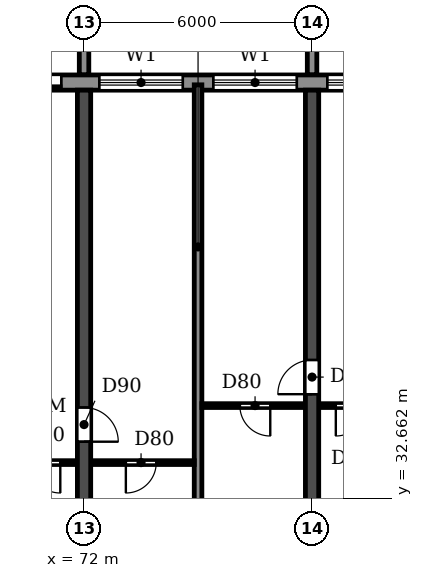
"""IFC4 building model, lengths in metres.
Left out: names, types, materials, properties, quantities, classifications, styles, units other than length and angle.
Written with IfcOpenShell. Run it as: python <this file> out.ifc"""

import sys

from ifc_helpers import new_model, si_unit, direction, frame, frame_2d, origin, place, context, subcontext, project, spatial, polyline, rectangle, outline, extrude, source, transform, mapped, element, fill, save


model = new_model("IFC4")
c1 = context("Model", 3, precision=1e-05, world=origin(), true_north=direction((0.0, 1.0)))
c2 = subcontext(c1, "Body", "Model", "MODEL_VIEW")
j1 = project(units=[si_unit("LENGTHUNIT", "METRE"), si_unit("PLANEANGLEUNIT", "RADIAN")], contexts=[c1])
p1 = place(None, origin())
s1 = spatial("IfcSite", under=j1, at=p1, CompositionType="ELEMENT")
p2 = place(p1, origin())
s2 = spatial("IfcBuilding", under=s1, at=p2, CompositionType="ELEMENT")
p3 = place(p2, frame((0.0, 0.0, 76.2)))
s3 = spatial("IfcBuildingStorey", under=s2, at=p3, CompositionType="ELEMENT", Elevation=76.2)
p4 = place(p3, frame((72.0, 30.525, 0.0), z_axis=(0.0, 0.0, 1.0), x_axis=(0.0, 1.0, 0.0)))
e1 = element("IfcWall", 1, at=p4, inside=s3, PredefinedType="SHEAR", context=c2, shape_type="SweptSolid", body=[
    extrude(rectangle(XDim=12.875, YDim=0.35, at=frame_2d((6.438, 0.0))), origin(), (0.0, 0.0, 1.0), 3.06),
])
p5 = place(p4, frame((3.625, 0.0, 0.0)))
e2 = element("IfcOpeningElement", 2, at=p5, cuts=e1, PredefinedType="OPENING", context=c2, shape_type="SweptSolid", body=[
    extrude(rectangle(XDim=0.9, YDim=2.1, at=frame_2d((0.45, 1.05))), frame((0.0, 0.185, 0.0), z_axis=(0.0, -1.0, 0.0), x_axis=(1.0, 0.0, 0.0)), (0.0, 0.0, 1.0), 0.37),
])
p6 = place(p3, frame((78.0, 30.525, 0.0), z_axis=(0.0, 0.0, 1.0), x_axis=(0.0, 1.0, 0.0)))
e3 = element("IfcWall", 3, at=p6, inside=s3, PredefinedType="SHEAR", context=c2, shape_type="SweptSolid", body=[
    extrude(rectangle(XDim=12.875, YDim=0.35, at=frame_2d((6.438, 0.0))), origin(), (0.0, 0.0, 1.0), 3.06),
])
p7 = place(p6, frame((4.875, 0.0, 0.0)))
e4 = element("IfcOpeningElement", 4, at=p7, cuts=e3, PredefinedType="OPENING", context=c2, shape_type="SweptSolid", body=[
    extrude(rectangle(XDim=0.9, YDim=2.1, at=frame_2d((0.45, 1.05))), frame((0.0, 0.185, 0.0), z_axis=(0.0, -1.0, 0.0), x_axis=(1.0, 0.0, 0.0)), (0.0, 0.0, 1.0), 0.37),
])
p8 = place(p3, frame((91.317, 43.6, 0.0), z_axis=(0.0, 0.0, 1.0), x_axis=(-1.0, 0.0, 0.0)))
e5 = element("IfcWall", 5, at=p8, inside=s3, PredefinedType="STANDARD", context=c2, shape_type="SweptSolid", body=[
    extrude(rectangle(XDim=80.634, YDim=0.4, at=frame_2d((40.317, 0.0))), origin(), (0.0, 0.0, 1.0), 3.06),
])
p9 = place(p8, frame((76.717, 0.0, 0.9)))
e6 = element("IfcOpeningElement", 6, at=p9, cuts=e5, PredefinedType="OPENING", context=c2, shape_type="SweptSolid", body=[
    extrude(rectangle(XDim=2.2, YDim=1.5, at=frame_2d((1.1, 0.75))), frame((0.0, 0.21, 0.0), z_axis=(0.0, -1.0, 0.0), x_axis=(1.0, 0.0, 0.0)), (0.0, 0.0, 1.0), 0.42),
])
p10 = place(p8, frame((73.917, 0.0, 0.0)))
e7 = element("IfcOpeningElement", 7, at=p10, cuts=e5, PredefinedType="OPENING", context=c2, shape_type="SweptSolid", body=[
    extrude(rectangle(XDim=1.8, YDim=2.4, at=frame_2d((0.9, 1.2))), frame((0.0, 0.21, 0.0), z_axis=(0.0, -1.0, 0.0), x_axis=(1.0, 0.0, 0.0)), (0.0, 0.0, 1.0), 0.42),
])
p11 = place(p8, frame((70.917, 0.0, 0.0)))
e8 = element("IfcOpeningElement", 8, at=p11, cuts=e5, PredefinedType="OPENING", context=c2, shape_type="SweptSolid", body=[
    extrude(rectangle(XDim=1.8, YDim=2.4, at=frame_2d((0.9, 1.2))), frame((0.0, 0.21, 0.0), z_axis=(0.0, -1.0, 0.0), x_axis=(1.0, 0.0, 0.0)), (0.0, 0.0, 1.0), 0.42),
])
p12 = place(p8, frame((67.717, 0.0, 0.9)))
e9 = element("IfcOpeningElement", 9, at=p12, cuts=e5, PredefinedType="OPENING", context=c2, shape_type="SweptSolid", body=[
    extrude(rectangle(XDim=2.2, YDim=1.5, at=frame_2d((1.1, 0.75))), frame((0.0, 0.21, 0.0), z_axis=(0.0, -1.0, 0.0), x_axis=(1.0, 0.0, 0.0)), (0.0, 0.0, 1.0), 0.42),
])
p13 = place(p8, frame((64.717, 0.0, 0.9)))
e10 = element("IfcOpeningElement", 10, at=p13, cuts=e5, PredefinedType="OPENING", context=c2, shape_type="SweptSolid", body=[
    extrude(rectangle(XDim=2.2, YDim=1.5, at=frame_2d((1.1, 0.75))), frame((0.0, 0.21, 0.0), z_axis=(0.0, -1.0, 0.0), x_axis=(1.0, 0.0, 0.0)), (0.0, 0.0, 1.0), 0.42),
])
p14 = place(p8, frame((61.917, 0.0, 0.0)))
e11 = element("IfcOpeningElement", 11, at=p14, cuts=e5, PredefinedType="OPENING", context=c2, shape_type="SweptSolid", body=[
    extrude(rectangle(XDim=1.8, YDim=2.4, at=frame_2d((0.9, 1.2))), frame((0.0, 0.21, 0.0), z_axis=(0.0, -1.0, 0.0), x_axis=(1.0, 0.0, 0.0)), (0.0, 0.0, 1.0), 0.42),
])
p15 = place(p8, frame((58.717, 0.0, 0.9)))
e12 = element("IfcOpeningElement", 12, at=p15, cuts=e5, PredefinedType="OPENING", context=c2, shape_type="SweptSolid", body=[
    extrude(rectangle(XDim=2.2, YDim=1.5, at=frame_2d((1.1, 0.75))), frame((0.0, 0.21, 0.0), z_axis=(0.0, -1.0, 0.0), x_axis=(1.0, 0.0, 0.0)), (0.0, 0.0, 1.0), 0.42),
])
p16 = place(p8, frame((55.917, 0.0, 0.0)))
e13 = element("IfcOpeningElement", 13, at=p16, cuts=e5, PredefinedType="OPENING", context=c2, shape_type="SweptSolid", body=[
    extrude(rectangle(XDim=1.8, YDim=2.4, at=frame_2d((0.9, 1.2))), frame((0.0, 0.21, 0.0), z_axis=(0.0, -1.0, 0.0), x_axis=(1.0, 0.0, 0.0)), (0.0, 0.0, 1.0), 0.42),
])
p17 = place(p8, frame((52.717, 0.0, 0.9)))
e14 = element("IfcOpeningElement", 14, at=p17, cuts=e5, PredefinedType="OPENING", context=c2, shape_type="SweptSolid", body=[
    extrude(rectangle(XDim=2.2, YDim=1.5, at=frame_2d((1.1, 0.75))), frame((0.0, 0.21, 0.0), z_axis=(0.0, -1.0, 0.0), x_axis=(1.0, 0.0, 0.0)), (0.0, 0.0, 1.0), 0.42),
])
p18 = place(p8, frame((49.717, 0.0, 0.9)))
e15 = element("IfcOpeningElement", 15, at=p18, cuts=e5, PredefinedType="OPENING", context=c2, shape_type="SweptSolid", body=[
    extrude(rectangle(XDim=2.2, YDim=1.5, at=frame_2d((1.1, 0.75))), frame((0.0, 0.21, 0.0), z_axis=(0.0, -1.0, 0.0), x_axis=(1.0, 0.0, 0.0)), (0.0, 0.0, 1.0), 0.42),
])
p19 = place(p8, frame((46.917, 0.0, 0.0)))
e16 = element("IfcOpeningElement", 16, at=p19, cuts=e5, PredefinedType="OPENING", context=c2, shape_type="SweptSolid", body=[
    extrude(rectangle(XDim=1.8, YDim=2.4, at=frame_2d((0.9, 1.2))), frame((0.0, 0.21, 0.0), z_axis=(0.0, -1.0, 0.0), x_axis=(1.0, 0.0, 0.0)), (0.0, 0.0, 1.0), 0.42),
])
p20 = place(p8, frame((43.717, 0.0, 0.9)))
e17 = element("IfcOpeningElement", 17, at=p20, cuts=e5, PredefinedType="OPENING", context=c2, shape_type="SweptSolid", body=[
    extrude(rectangle(XDim=2.2, YDim=1.5, at=frame_2d((1.1, 0.75))), frame((0.0, 0.21, 0.0), z_axis=(0.0, -1.0, 0.0), x_axis=(1.0, 0.0, 0.0)), (0.0, 0.0, 1.0), 0.42),
])
p21 = place(p8, frame((40.717, 0.0, 0.9)))
e18 = element("IfcOpeningElement", 18, at=p21, cuts=e5, PredefinedType="OPENING", context=c2, shape_type="SweptSolid", body=[
    extrude(rectangle(XDim=2.2, YDim=1.5, at=frame_2d((1.1, 0.75))), frame((0.0, 0.21, 0.0), z_axis=(0.0, -1.0, 0.0), x_axis=(1.0, 0.0, 0.0)), (0.0, 0.0, 1.0), 0.42),
])
p22 = place(p8, frame((37.917, 0.0, 0.0)))
e19 = element("IfcOpeningElement", 19, at=p22, cuts=e5, PredefinedType="OPENING", context=c2, shape_type="SweptSolid", body=[
    extrude(rectangle(XDim=1.8, YDim=2.4, at=frame_2d((0.9, 1.2))), frame((0.0, 0.21, 0.0), z_axis=(0.0, -1.0, 0.0), x_axis=(1.0, 0.0, 0.0)), (0.0, 0.0, 1.0), 0.42),
])
p23 = place(p8, frame((34.717, 0.0, 0.9)))
e20 = element("IfcOpeningElement", 20, at=p23, cuts=e5, PredefinedType="OPENING", context=c2, shape_type="SweptSolid", body=[
    extrude(rectangle(XDim=2.2, YDim=1.5, at=frame_2d((1.1, 0.75))), frame((0.0, 0.21, 0.0), z_axis=(0.0, -1.0, 0.0), x_axis=(1.0, 0.0, 0.0)), (0.0, 0.0, 1.0), 0.42),
])
p24 = place(p8, frame((31.917, 0.0, 0.0)))
e21 = element("IfcOpeningElement", 21, at=p24, cuts=e5, PredefinedType="OPENING", context=c2, shape_type="SweptSolid", body=[
    extrude(rectangle(XDim=1.8, YDim=2.4, at=frame_2d((0.9, 1.2))), frame((0.0, 0.21, 0.0), z_axis=(0.0, -1.0, 0.0), x_axis=(1.0, 0.0, 0.0)), (0.0, 0.0, 1.0), 0.42),
])
p25 = place(p8, frame((28.717, 0.0, 0.9)))
e22 = element("IfcOpeningElement", 22, at=p25, cuts=e5, PredefinedType="OPENING", context=c2, shape_type="SweptSolid", body=[
    extrude(rectangle(XDim=2.2, YDim=1.5, at=frame_2d((1.1, 0.75))), frame((0.0, 0.21, 0.0), z_axis=(0.0, -1.0, 0.0), x_axis=(1.0, 0.0, 0.0)), (0.0, 0.0, 1.0), 0.42),
])
p26 = place(p8, frame((25.717, 0.0, 0.9)))
e23 = element("IfcOpeningElement", 23, at=p26, cuts=e5, PredefinedType="OPENING", context=c2, shape_type="SweptSolid", body=[
    extrude(rectangle(XDim=2.2, YDim=1.5, at=frame_2d((1.1, 0.75))), frame((0.0, 0.21, 0.0), z_axis=(0.0, -1.0, 0.0), x_axis=(1.0, 0.0, 0.0)), (0.0, 0.0, 1.0), 0.42),
])
p27 = place(p8, frame((22.717, 0.0, 0.9)))
e24 = element("IfcOpeningElement", 24, at=p27, cuts=e5, PredefinedType="OPENING", context=c2, shape_type="SweptSolid", body=[
    extrude(rectangle(XDim=2.2, YDim=1.5, at=frame_2d((1.1, 0.75))), frame((0.0, 0.21, 0.0), z_axis=(0.0, -1.0, 0.0), x_axis=(1.0, 0.0, 0.0)), (0.0, 0.0, 1.0), 0.42),
])
p28 = place(p8, frame((19.917, 0.0, 0.0)))
e25 = element("IfcOpeningElement", 25, at=p28, cuts=e5, PredefinedType="OPENING", context=c2, shape_type="SweptSolid", body=[
    extrude(rectangle(XDim=1.8, YDim=2.4, at=frame_2d((0.9, 1.2))), frame((0.0, 0.21, 0.0), z_axis=(0.0, -1.0, 0.0), x_axis=(1.0, 0.0, 0.0)), (0.0, 0.0, 1.0), 0.42),
])
p29 = place(p8, frame((16.717, 0.0, 0.9)))
e26 = element("IfcOpeningElement", 26, at=p29, cuts=e5, PredefinedType="OPENING", context=c2, shape_type="SweptSolid", body=[
    extrude(rectangle(XDim=2.2, YDim=1.5, at=frame_2d((1.1, 0.75))), frame((0.0, 0.21, 0.0), z_axis=(0.0, -1.0, 0.0), x_axis=(1.0, 0.0, 0.0)), (0.0, 0.0, 1.0), 0.42),
])
p30 = place(p8, frame((13.717, 0.0, 0.9)))
e27 = element("IfcOpeningElement", 27, at=p30, cuts=e5, PredefinedType="OPENING", context=c2, shape_type="SweptSolid", body=[
    extrude(rectangle(XDim=2.2, YDim=1.5, at=frame_2d((1.1, 0.75))), frame((0.0, 0.21, 0.0), z_axis=(0.0, -1.0, 0.0), x_axis=(1.0, 0.0, 0.0)), (0.0, 0.0, 1.0), 0.42),
])
p31 = place(p8, frame((10.717, 0.0, 0.9)))
e28 = element("IfcOpeningElement", 28, at=p31, cuts=e5, PredefinedType="OPENING", context=c2, shape_type="SweptSolid", body=[
    extrude(rectangle(XDim=2.2, YDim=1.5, at=frame_2d((1.1, 0.75))), frame((0.0, 0.21, 0.0), z_axis=(0.0, -1.0, 0.0), x_axis=(1.0, 0.0, 0.0)), (0.0, 0.0, 1.0), 0.42),
])
p32 = place(p8, frame((7.917, 0.0, 0.0)))
e29 = element("IfcOpeningElement", 29, at=p32, cuts=e5, PredefinedType="OPENING", context=c2, shape_type="SweptSolid", body=[
    extrude(rectangle(XDim=1.8, YDim=2.4, at=frame_2d((0.9, 1.2))), frame((0.0, 0.21, 0.0), z_axis=(0.0, -1.0, 0.0), x_axis=(1.0, 0.0, 0.0)), (0.0, 0.0, 1.0), 0.42),
])
p33 = place(p8, frame((4.717, 0.0, 0.9)))
e30 = element("IfcOpeningElement", 30, at=p33, cuts=e5, PredefinedType="OPENING", context=c2, shape_type="SweptSolid", body=[
    extrude(rectangle(XDim=2.2, YDim=1.5, at=frame_2d((1.1, 0.75))), frame((0.0, 0.21, 0.0), z_axis=(0.0, -1.0, 0.0), x_axis=(1.0, 0.0, 0.0)), (0.0, 0.0, 1.0), 0.42),
])
p34 = place(p8, frame((1.917, 0.0, 0.0)))
e31 = element("IfcOpeningElement", 31, at=p34, cuts=e5, PredefinedType="OPENING", context=c2, shape_type="SweptSolid", body=[
    extrude(rectangle(XDim=1.8, YDim=2.4, at=frame_2d((0.9, 1.2))), frame((0.0, 0.21, 0.0), z_axis=(0.0, -1.0, 0.0), x_axis=(1.0, 0.0, 0.0)), (0.0, 0.0, 1.0), 0.42),
])
m1 = source(origin(), c2, "Body", "SweptSolid", [
    extrude(outline(polyline([(0.0, 0.0), (0.25, 0.0), (0.25, 3.1), (0.0, 3.1), (0.0, 0.0)])), origin(), (0.0, 0.0, 1.0), 3.1),
])
for number, where in (
    (32, (71.875, 43.8, 0.0)),
    (33, (77.875, 43.8, 0.0)),
):
    element("IfcWall", number, at=place(p3, frame(where)), inside=s3, PredefinedType="STANDARD", context=c2, shape_type="MappedRepresentation", body=[
        mapped(m1, transform((0.0, 0.0, 0.0))),
    ])
p35 = place(p3, frame((75.0, 30.535, 0.0), z_axis=(0.0, 0.0, 1.0), x_axis=(0.0, 1.0, 0.0)))
e34 = element("IfcWall", 34, at=p35, inside=s3, PredefinedType="PARTITIONING", context=c2, shape_type="SweptSolid", body=[
    extrude(rectangle(XDim=13.005, YDim=0.2, at=frame_2d((6.502, 0.0))), origin(), (0.0, 0.0, 1.0), 3.06),
])
p36 = place(p3, frame((69.9, 33.6, 0.0), z_axis=(0.0, 0.0, 1.0), x_axis=(1.0, 0.0, 0.0)))
e35 = element("IfcWall", 35, at=p36, inside=s3, PredefinedType="PARTITIONING", context=c2, shape_type="SweptSolid", body=[
    extrude(rectangle(XDim=1.915, YDim=0.1, at=frame_2d((0.958, 0.0))), origin(), (0.0, 0.0, 1.0), 3.06),
])
p37 = place(p36, frame((0.675, 0.0, 0.0)))
e36 = element("IfcOpeningElement", 36, at=p37, cuts=e35, PredefinedType="OPENING", context=c2, shape_type="SweptSolid", body=[
    extrude(rectangle(XDim=0.8, YDim=2.1, at=frame_2d((0.4, 1.05))), frame((0.0, 0.06, 0.0), z_axis=(0.0, -1.0, 0.0), x_axis=(1.0, 0.0, 0.0)), (0.0, 0.0, 1.0), 0.12),
])
p38 = place(p3, frame((72.185, 33.6, 0.0), z_axis=(0.0, 0.0, 1.0), x_axis=(1.0, 0.0, 0.0)))
e37 = element("IfcWall", 37, at=p38, inside=s3, PredefinedType="PARTITIONING", context=c2, shape_type="SweptSolid", body=[
    extrude(rectangle(XDim=2.715, YDim=0.1, at=frame_2d((1.357, 0.0))), origin(), (0.0, 0.0, 1.0), 3.06),
])
p39 = place(p38, frame((0.915, 0.0, 0.0)))
e38 = element("IfcOpeningElement", 38, at=p39, cuts=e37, PredefinedType="OPENING", context=c2, shape_type="SweptSolid", body=[
    extrude(rectangle(XDim=0.8, YDim=2.1, at=frame_2d((0.4, 1.05))), frame((0.0, 0.06, 0.0), z_axis=(0.0, -1.0, 0.0), x_axis=(1.0, 0.0, 0.0)), (0.0, 0.0, 1.0), 0.12),
])
p40 = place(p3, frame((75.1, 35.1, 0.0), z_axis=(0.0, 0.0, 1.0), x_axis=(1.0, 0.0, 0.0)))
e39 = element("IfcWall", 39, at=p40, inside=s3, PredefinedType="PARTITIONING", context=c2, shape_type="SweptSolid", body=[
    extrude(rectangle(XDim=2.715, YDim=0.1, at=frame_2d((1.357, 0.0))), origin(), (0.0, 0.0, 1.0), 3.06),
])
p41 = place(p40, frame((1.0, 0.0, 0.0)))
e40 = element("IfcOpeningElement", 40, at=p41, cuts=e39, PredefinedType="OPENING", context=c2, shape_type="SweptSolid", body=[
    extrude(rectangle(XDim=0.8, YDim=2.1, at=frame_2d((0.4, 1.05))), frame((0.0, 0.06, 0.0), z_axis=(0.0, -1.0, 0.0), x_axis=(1.0, 0.0, 0.0)), (0.0, 0.0, 1.0), 0.12),
])
p42 = place(p3, frame((78.185, 35.1, 0.0), z_axis=(0.0, 0.0, 1.0), x_axis=(1.0, 0.0, 0.0)))
e41 = element("IfcWall", 41, at=p42, inside=s3, PredefinedType="PARTITIONING", context=c2, shape_type="SweptSolid", body=[
    extrude(rectangle(XDim=1.915, YDim=0.1, at=frame_2d((0.958, 0.0))), origin(), (0.0, 0.0, 1.0), 3.06),
])
p43 = place(p42, frame((0.44, 0.0, 0.0)))
e42 = element("IfcOpeningElement", 42, at=p43, cuts=e41, PredefinedType="OPENING", context=c2, shape_type="SweptSolid", body=[
    extrude(rectangle(XDim=0.8, YDim=2.1, at=frame_2d((0.4, 1.05))), frame((0.0, 0.06, 0.0), z_axis=(0.0, -1.0, 0.0), x_axis=(1.0, 0.0, 0.0)), (0.0, 0.0, 1.0), 0.12),
])
p44 = place(p28, origin())
e43 = element("IfcDoor", 43, at=p44, inside=s3, OperationType="DOUBLE_DOOR_SLIDING", PredefinedType="DOOR", context=c2, shape_type="SweptSolid", body=[
    extrude(rectangle(XDim=1.8, YDim=2.4, at=frame_2d((0.9, 1.2))), frame((0.0, 0.025, 0.0), z_axis=(0.0, -1.0, 0.0), x_axis=(1.0, 0.0, 0.0)), (0.0, 0.0, 1.0), 0.05),
])
fill(e25, e43)
p45 = place(p29, origin())
e44 = element("IfcWindow", 44, at=p45, inside=s3, PartitioningType="DOUBLE_PANEL_HORIZONTAL", PredefinedType="WINDOW", context=c2, shape_type="SweptSolid", body=[
    extrude(rectangle(XDim=2.2, YDim=1.5, at=frame_2d((1.1, 0.75))), frame((0.0, 0.03, 0.0), z_axis=(0.0, -1.0, 0.0), x_axis=(1.0, 0.0, 0.0)), (0.0, 0.0, 1.0), 0.06),
])
fill(e26, e44)
p46 = place(p30, origin())
e45 = element("IfcWindow", 45, at=p46, inside=s3, PartitioningType="DOUBLE_PANEL_HORIZONTAL", PredefinedType="WINDOW", context=c2, shape_type="SweptSolid", body=[
    extrude(rectangle(XDim=2.2, YDim=1.5, at=frame_2d((1.1, 0.75))), frame((0.0, 0.03, 0.0), z_axis=(0.0, -1.0, 0.0), x_axis=(1.0, 0.0, 0.0)), (0.0, 0.0, 1.0), 0.06),
])
fill(e27, e45)
p47 = place(p31, origin())
e46 = element("IfcWindow", 46, at=p47, inside=s3, PartitioningType="DOUBLE_PANEL_HORIZONTAL", PredefinedType="WINDOW", context=c2, shape_type="SweptSolid", body=[
    extrude(rectangle(XDim=2.2, YDim=1.5, at=frame_2d((1.1, 0.75))), frame((0.0, 0.03, 0.0), z_axis=(0.0, -1.0, 0.0), x_axis=(1.0, 0.0, 0.0)), (0.0, 0.0, 1.0), 0.06),
])
fill(e28, e46)
p48 = place(p39, frame((0.8, 0.0, 0.0), z_axis=(0.0, 0.0, 1.0), x_axis=(-1.0, 0.0, 0.0)))
e47 = element("IfcDoor", 47, at=p48, inside=s3, OperationType="SINGLE_SWING_RIGHT", PredefinedType="DOOR", context=c2, shape_type="SweptSolid", body=[
    extrude(rectangle(XDim=0.8, YDim=2.1, at=frame_2d((0.4, 1.05))), frame((0.0, 0.025, 0.0), z_axis=(0.0, -1.0, 0.0), x_axis=(1.0, 0.0, 0.0)), (0.0, 0.0, 1.0), 0.05),
])
fill(e38, e47)
p49 = place(p37, frame((0.8, 0.0, 0.0), z_axis=(0.0, 0.0, 1.0), x_axis=(-1.0, 0.0, 0.0)))
e48 = element("IfcDoor", 48, at=p49, inside=s3, OperationType="SINGLE_SWING_LEFT", PredefinedType="DOOR", context=c2, shape_type="SweptSolid", body=[
    extrude(rectangle(XDim=0.8, YDim=2.1, at=frame_2d((0.4, 1.05))), frame((0.0, 0.025, 0.0), z_axis=(0.0, -1.0, 0.0), x_axis=(1.0, 0.0, 0.0)), (0.0, 0.0, 1.0), 0.05),
])
fill(e36, e48)
p50 = place(p5, frame((0.9, 0.0, 0.0), z_axis=(0.0, 0.0, 1.0), x_axis=(-1.0, 0.0, 0.0)))
e49 = element("IfcDoor", 49, at=p50, inside=s3, OperationType="SINGLE_SWING_RIGHT", PredefinedType="DOOR", context=c2, shape_type="SweptSolid", body=[
    extrude(rectangle(XDim=0.9, YDim=2.1, at=frame_2d((0.45, 1.05))), frame((0.0, 0.025, 0.0), z_axis=(0.0, -1.0, 0.0), x_axis=(1.0, 0.0, 0.0)), (0.0, 0.0, 1.0), 0.05),
])
fill(e2, e49)
p51 = place(p41, frame((0.8, 0.0, 0.0), z_axis=(0.0, 0.0, 1.0), x_axis=(-1.0, 0.0, 0.0)))
e50 = element("IfcDoor", 50, at=p51, inside=s3, OperationType="SINGLE_SWING_LEFT", PredefinedType="DOOR", context=c2, shape_type="SweptSolid", body=[
    extrude(rectangle(XDim=0.8, YDim=2.1, at=frame_2d((0.4, 1.05))), frame((0.0, 0.025, 0.0), z_axis=(0.0, -1.0, 0.0), x_axis=(1.0, 0.0, 0.0)), (0.0, 0.0, 1.0), 0.05),
])
fill(e40, e50)
p52 = place(p7, origin())
e51 = element("IfcDoor", 51, at=p52, inside=s3, OperationType="SINGLE_SWING_LEFT", PredefinedType="DOOR", context=c2, shape_type="SweptSolid", body=[
    extrude(rectangle(XDim=0.9, YDim=2.1, at=frame_2d((0.45, 1.05))), frame((0.0, 0.025, 0.0), z_axis=(0.0, -1.0, 0.0), x_axis=(1.0, 0.0, 0.0)), (0.0, 0.0, 1.0), 0.05),
])
fill(e4, e51)
p53 = place(p43, frame((0.8, 0.0, 0.0), z_axis=(0.0, 0.0, 1.0), x_axis=(-1.0, 0.0, 0.0)))
e52 = element("IfcDoor", 52, at=p53, inside=s3, OperationType="SINGLE_SWING_RIGHT", PredefinedType="DOOR", context=c2, shape_type="SweptSolid", body=[
    extrude(rectangle(XDim=0.8, YDim=2.1, at=frame_2d((0.4, 1.05))), frame((0.0, 0.025, 0.0), z_axis=(0.0, -1.0, 0.0), x_axis=(1.0, 0.0, 0.0)), (0.0, 0.0, 1.0), 0.05),
])
fill(e42, e52)
save(model, sys.argv[1])
